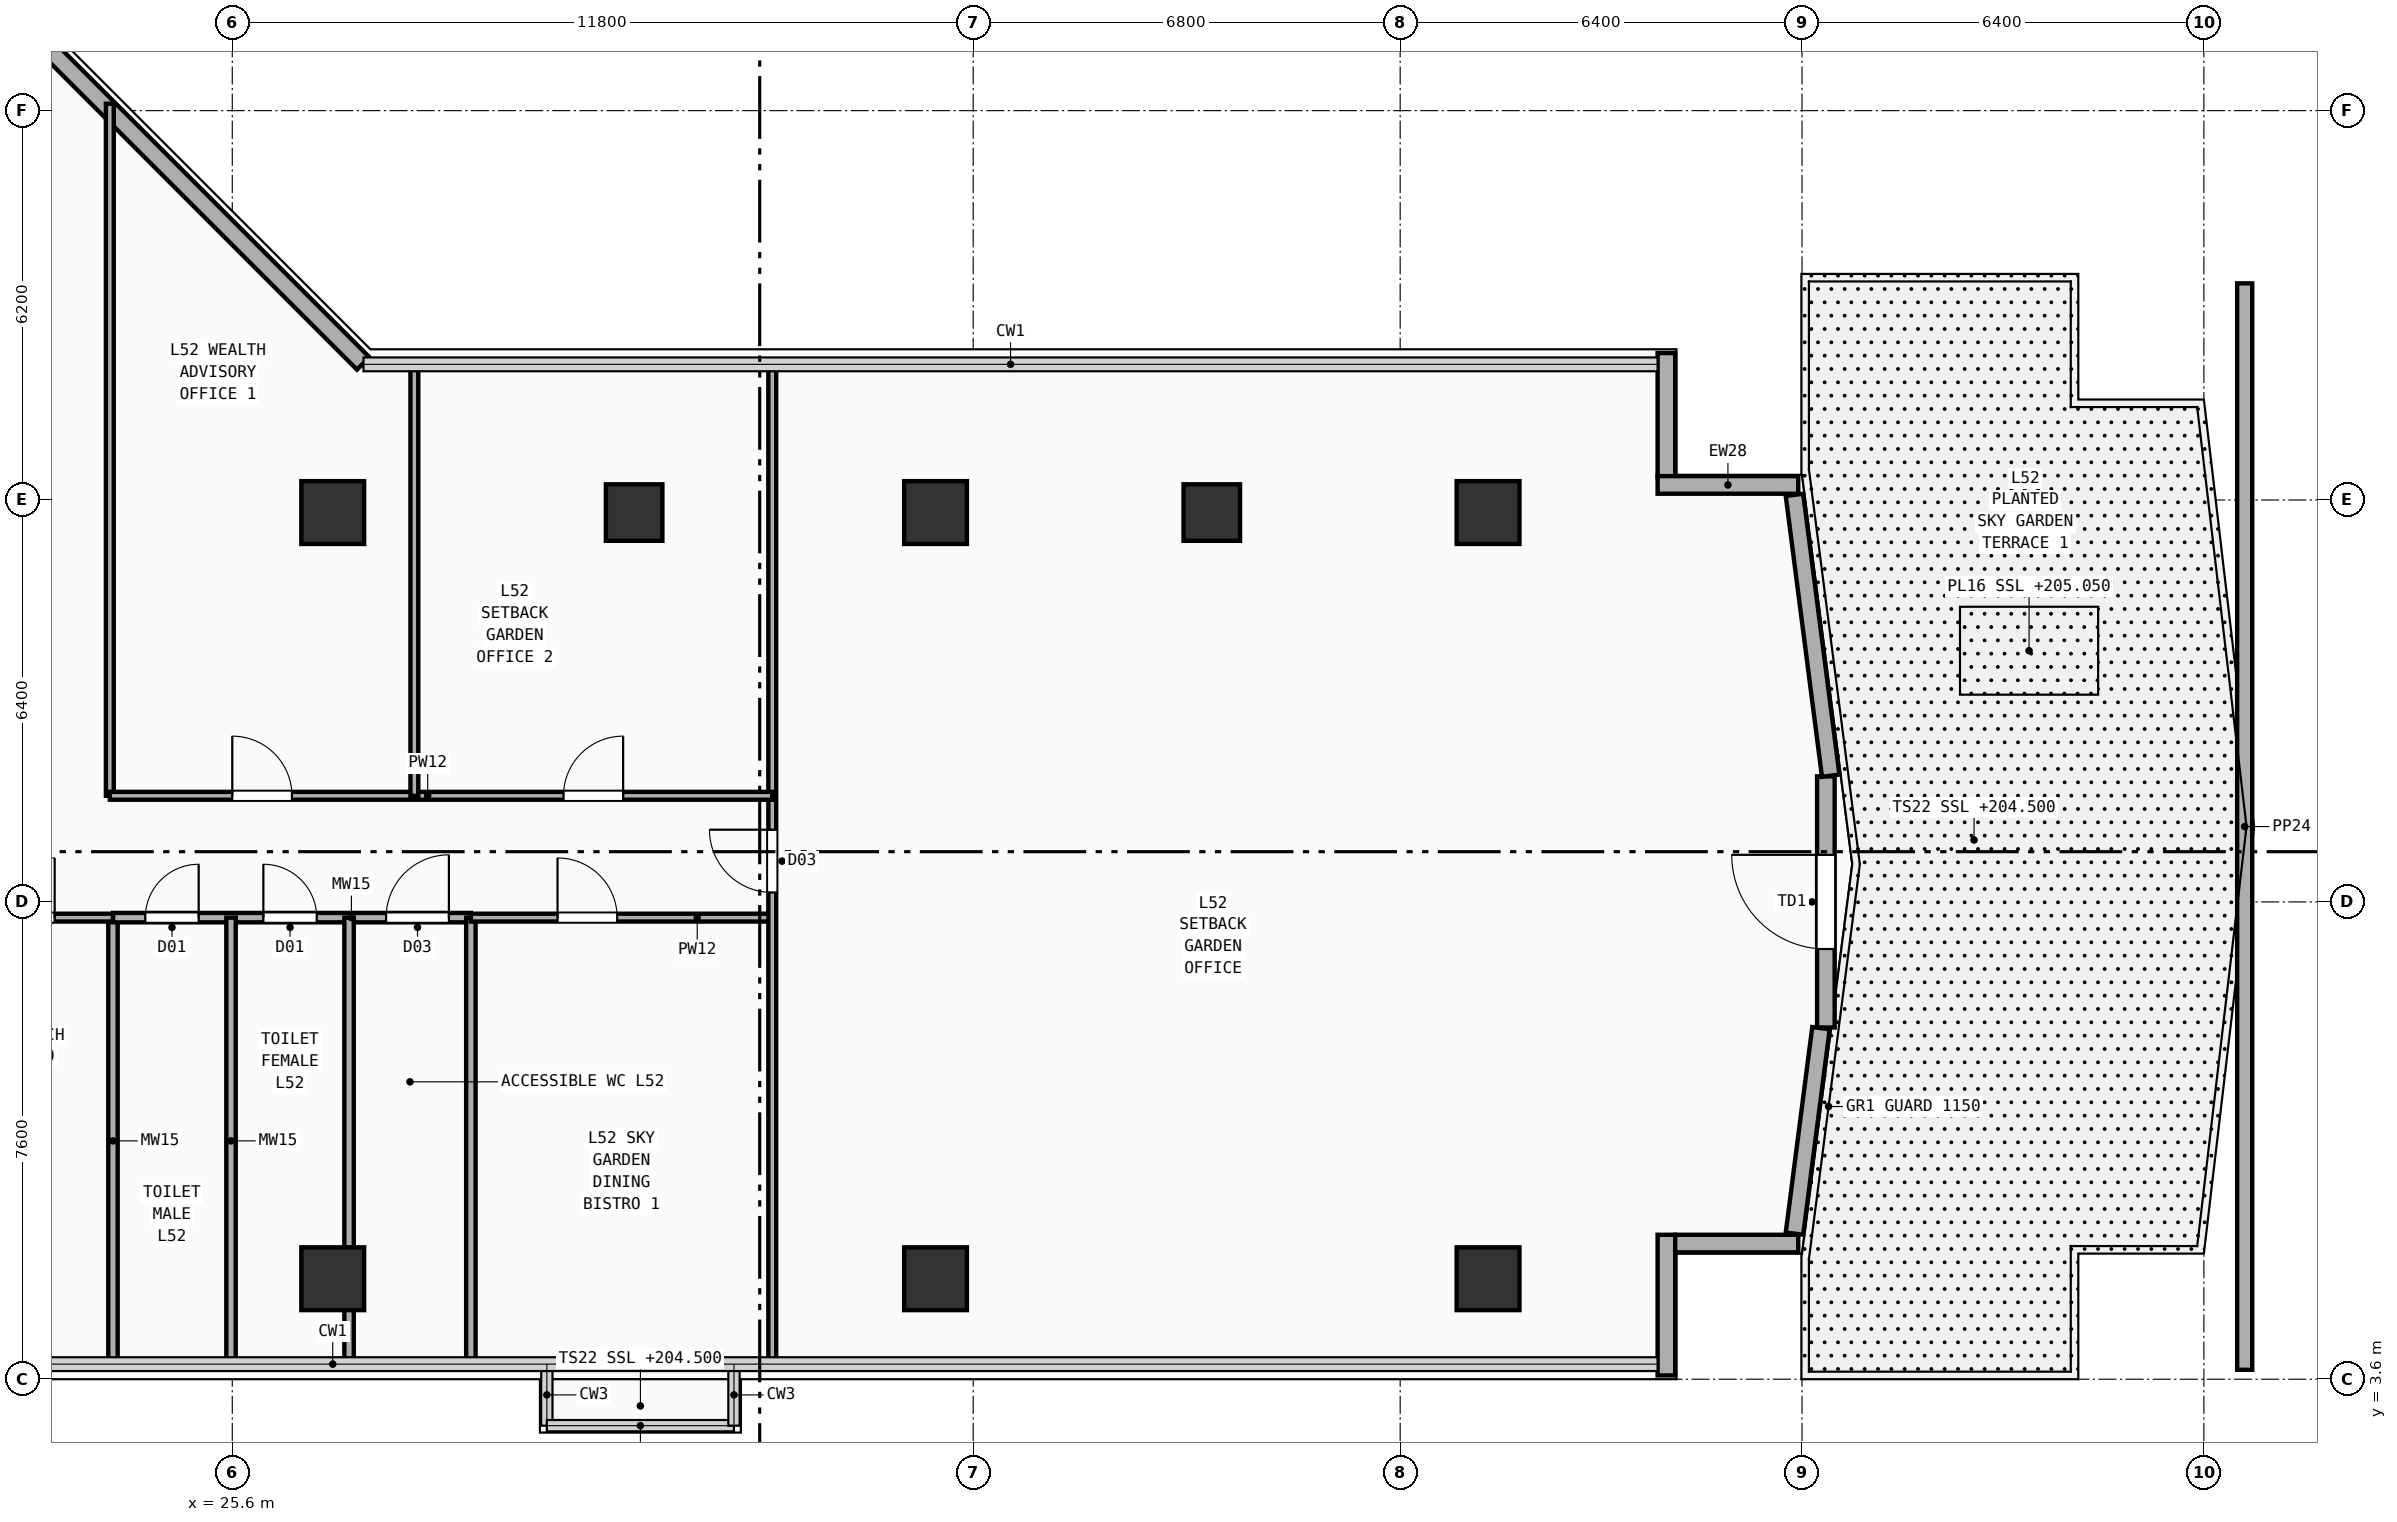
"""IFC4 building model, lengths in metres.
Left out: names, types, materials, properties, quantities, classifications, styles, units other than length and angle.
Written with IfcOpenShell. Run it as: python <this file> out.ifc"""

import sys

from ifc_helpers import new_model, si_unit, direction, frame, frame_2d, origin, origin_2d, place, context, subcontext, project, spatial, rectangle, extrude, element, fill, save


model = new_model("IFC4")
c1 = context("Model", 3, precision=1e-05, world=origin(), true_north=direction((0.0, 1.0)))
c2 = subcontext(c1, "Body", "Model", "MODEL_VIEW")
j1 = project(units=[si_unit("LENGTHUNIT", "METRE"), si_unit("PLANEANGLEUNIT", "RADIAN")], contexts=[c1])
p1 = place(None, origin())
s1 = spatial("IfcSite", under=j1, at=p1, CompositionType="ELEMENT")
p2 = place(p1, origin())
s2 = spatial("IfcBuilding", under=s1, at=p2, CompositionType="ELEMENT")
p3 = place(p2, frame((0.0, 0.0, 204.5)))
s3 = spatial("IfcBuildingStorey", under=s2, at=p3, CompositionType="ELEMENT", Elevation=204.5)
for number, where, z_axis, x_axis in (
    (1, (27.2, 5.2, 0.0), (0.0, 0.0, 1.0), (1.0, 0.0, 0.0)),
    (2, (36.8, 5.2, 0.0), (0.0, 0.0, 1.0), (1.0, 0.0, 0.0)),
    (3, (45.6, 5.2, 0.0), (0.0, 0.0, 1.0), (1.0, 0.0, 0.0)),
    (4, (27.2, 17.4, 0.0), (0.0, 0.0, 1.0), (1.0, 0.0, 0.0)),
    (5, (36.8, 17.4, 0.0), (0.0, 0.0, 1.0), (1.0, 0.0, 0.0)),
    (6, (45.6, 17.4, 0.0), (0.0, 0.0, 1.0), (1.0, 0.0, 0.0)),
):
    element("IfcColumn", number, at=place(p3, frame(where, z_axis=z_axis, x_axis=x_axis)), inside=s3, PredefinedType="COLUMN", context=c2, shape_type="SweptSolid", body=[
        extrude(rectangle(XDim=1.0, YDim=1.0, at=origin_2d()), origin(), (0.0, 0.0, 1.0), 3.56),
    ])
for number, where, z_axis, x_axis in (
    (7, (32.0, 17.4, 0.0), (0.0, 0.0, 1.0), (1.0, 0.0, 0.0)),
    (8, (41.2, 17.4, 0.0), (0.0, 0.0, 1.0), (1.0, 0.0, 0.0)),
):
    element("IfcColumn", number, at=place(p3, frame(where, z_axis=z_axis, x_axis=x_axis)), inside=s3, PredefinedType="COLUMN", context=c2, shape_type="SweptSolid", body=[
        extrude(rectangle(XDim=0.9, YDim=0.9, at=origin_2d()), origin(), (0.0, 0.0, 1.0), 3.56),
    ])
p4 = place(p3, frame((50.98, 9.2, 0.0), z_axis=(0.0, 0.0, 1.0), x_axis=(0.0, 1.0, 0.0)))
e9 = element("IfcWall", 9, at=p4, inside=s3, PredefinedType="SOLIDWALL", context=c2, shape_type="SweptSolid", body=[
    extrude(rectangle(XDim=4.0, YDim=0.28, at=frame_2d((2.0, 0.0))), origin(), (0.0, 0.0, 1.0), 3.56),
])
p5 = place(p4, frame((1.25, 0.0, 0.0)))
e10 = element("IfcOpeningElement", 10, at=p5, cuts=e9, PredefinedType="OPENING", context=c2, shape_type="SweptSolid", body=[
    extrude(rectangle(XDim=1.5, YDim=2.25, at=frame_2d((0.75, 1.125))), frame((0.0, 0.15, 0.0), z_axis=(0.0, -1.0, 0.0), x_axis=(1.0, 0.0, 0.0)), (0.0, 0.0, 1.0), 0.3),
])
p6 = place(p3, frame((57.65, 3.75, 0.0), z_axis=(0.0, 0.0, 1.0), x_axis=(0.0, 1.0, 0.0)))
e11 = element("IfcWall", 11, at=p6, inside=s3, PredefinedType="PARAPET", context=c2, shape_type="SweptSolid", body=[
    extrude(rectangle(XDim=17.3, YDim=0.24, at=frame_2d((8.65, 0.0))), origin(), (0.0, 0.0, 1.0), 0.42),
])
p7 = place(p3, frame((48.44, 3.66, 0.0), z_axis=(0.0, 0.0, 1.0), x_axis=(0.0, 1.0, 0.0)))
e12 = element("IfcWall", 12, at=p7, inside=s3, PredefinedType="SOLIDWALL", context=c2, shape_type="SweptSolid", body=[
    extrude(rectangle(XDim=2.24, YDim=0.28, at=frame_2d((1.12, 0.0))), origin(), (0.0, 0.0, 1.0), 3.56),
])
p8 = place(p3, frame((48.58, 5.76, 0.0), z_axis=(0.0, 0.0, 1.0), x_axis=(1.0, 0.0, 0.0)))
e13 = element("IfcWall", 13, at=p8, inside=s3, PredefinedType="SOLIDWALL", context=c2, shape_type="SweptSolid", body=[
    extrude(rectangle(XDim=1.96, YDim=0.28, at=frame_2d((0.98, 0.0))), origin(), (0.0, 0.0, 1.0), 3.56),
])
p9 = place(p3, frame((48.44, 17.965, 0.0), z_axis=(0.0, 0.0, 1.0), x_axis=(0.0, 1.0, 0.0)))
e14 = element("IfcWall", 14, at=p9, inside=s3, PredefinedType="SOLIDWALL", context=c2, shape_type="SweptSolid", body=[
    extrude(rectangle(XDim=1.975, YDim=0.28, at=frame_2d((0.987, 0.0))), origin(), (0.0, 0.0, 1.0), 3.56),
])
p10 = place(p3, frame((48.3, 17.84, 0.0), z_axis=(0.0, 0.0, 1.0), x_axis=(1.0, 0.0, 0.0)))
e15 = element("IfcWall", 15, at=p10, inside=s3, PredefinedType="SOLIDWALL", context=c2, shape_type="SweptSolid", body=[
    extrude(rectangle(XDim=2.24, YDim=0.28, at=frame_2d((1.12, 0.0))), origin(), (0.0, 0.0, 1.0), 3.56),
])
p11 = place(p3, frame((27.685, 19.775, 0.0), z_axis=(0.0, 0.0, 1.0), x_axis=(-0.707106781187, 0.707106781187, 0.0)))
e16 = element("IfcWall", 16, at=p11, inside=s3, PredefinedType="SOLIDWALL", context=c2, shape_type="SweptSolid", body=[
    extrude(rectangle(XDim=9.207, YDim=0.28, at=frame_2d((4.603, 0.0))), origin(), (0.0, 0.0, 1.0), 3.56),
])
p12 = place(p3, frame((50.48, 5.918, 0.0), z_axis=(0.0, 0.0, 1.0), x_axis=(0.12795020487, 0.991780593213, 0.0)))
e17 = element("IfcWall", 17, at=p12, inside=s3, PredefinedType="SOLIDWALL", context=c2, shape_type="SweptSolid", body=[
    extrude(rectangle(XDim=3.299, YDim=0.28, at=frame_2d((1.649, 0.0))), origin(), (0.0, 0.0, 1.0), 3.56),
])
p13 = place(p3, frame((51.057, 13.21, 0.0), z_axis=(0.0, 0.0, 1.0), x_axis=(-0.127945567261, 0.991781191503, 0.0)))
e18 = element("IfcWall", 18, at=p13, inside=s3, PredefinedType="SOLIDWALL", context=c2, shape_type="SweptSolid", body=[
    extrude(rectangle(XDim=4.509, YDim=0.28, at=frame_2d((2.254, 0.0))), origin(), (0.0, 0.0, 1.0), 3.56),
])
p14 = place(p3, frame((23.7, 3.84, 0.0), z_axis=(0.0, 0.0, 1.0), x_axis=(0.0, 1.0, 0.0)))
e19 = element("IfcWall", 19, at=p14, inside=s3, PredefinedType="PLUMBINGWALL", context=c2, shape_type="SweptSolid", body=[
    extrude(rectangle(XDim=7.11, YDim=0.15, at=frame_2d((3.555, 0.0))), origin(), (0.0, 0.0, 1.0), 3.56),
])
p15 = place(p3, frame((23.7, 10.95, 0.0), z_axis=(0.0, 0.0, 1.0), x_axis=(1.0, 0.0, 0.0)))
e20 = element("IfcWall", 20, at=p15, inside=s3, PredefinedType="PLUMBINGWALL", context=c2, shape_type="SweptSolid", body=[
    extrude(rectangle(XDim=5.7, YDim=0.15, at=frame_2d((2.85, 0.0))), origin(), (0.0, 0.0, 1.0), 3.56),
])
p16 = place(p15, frame((0.515, 0.0, 0.0)))
e21 = element("IfcOpeningElement", 21, at=p16, cuts=e20, PredefinedType="OPENING", context=c2, shape_type="SweptSolid", body=[
    extrude(rectangle(XDim=0.85, YDim=2.15, at=frame_2d((0.425, 1.075))), frame((0.0, 0.085, 0.0), z_axis=(0.0, -1.0, 0.0), x_axis=(1.0, 0.0, 0.0)), (0.0, 0.0, 1.0), 0.17),
])
p17 = place(p15, frame((2.395, 0.0, 0.0)))
e22 = element("IfcOpeningElement", 22, at=p17, cuts=e20, PredefinedType="OPENING", context=c2, shape_type="SweptSolid", body=[
    extrude(rectangle(XDim=0.85, YDim=2.15, at=frame_2d((0.425, 1.075))), frame((0.0, 0.085, 0.0), z_axis=(0.0, -1.0, 0.0), x_axis=(1.0, 0.0, 0.0)), (0.0, 0.0, 1.0), 0.17),
])
p18 = place(p15, frame((4.35, 0.0, 0.0)))
e23 = element("IfcOpeningElement", 23, at=p18, cuts=e20, PredefinedType="OPENING", context=c2, shape_type="SweptSolid", body=[
    extrude(rectangle(XDim=1.0, YDim=2.2, at=frame_2d((0.5, 1.1))), frame((0.0, 0.085, 0.0), z_axis=(0.0, -1.0, 0.0), x_axis=(1.0, 0.0, 0.0)), (0.0, 0.0, 1.0), 0.17),
])
p19 = place(p3, frame((25.58, 3.84, 0.0), z_axis=(0.0, 0.0, 1.0), x_axis=(0.0, 1.0, 0.0)))
e24 = element("IfcWall", 24, at=p19, inside=s3, PredefinedType="PLUMBINGWALL", context=c2, shape_type="SweptSolid", body=[
    extrude(rectangle(XDim=7.11, YDim=0.15, at=frame_2d((3.555, 0.0))), origin(), (0.0, 0.0, 1.0), 3.56),
])
p20 = place(p3, frame((27.46, 3.84, 0.0), z_axis=(0.0, 0.0, 1.0), x_axis=(0.0, 1.0, 0.0)))
e25 = element("IfcWall", 25, at=p20, inside=s3, PredefinedType="PLUMBINGWALL", context=c2, shape_type="SweptSolid", body=[
    extrude(rectangle(XDim=7.11, YDim=0.15, at=frame_2d((3.555, 0.0))), origin(), (0.0, 0.0, 1.0), 3.16),
])
p21 = place(p3, frame((29.4, 3.84, 0.0), z_axis=(0.0, 0.0, 1.0), x_axis=(0.0, 1.0, 0.0)))
e26 = element("IfcWall", 26, at=p21, inside=s3, PredefinedType="PLUMBINGWALL", context=c2, shape_type="SweptSolid", body=[
    extrude(rectangle(XDim=7.11, YDim=0.15, at=frame_2d((3.555, 0.0))), origin(), (0.0, 0.0, 1.0), 3.56),
])
p22 = place(p3, frame((20.85, 10.95, 0.0), z_axis=(0.0, 0.0, 1.0), x_axis=(1.0, 0.0, 0.0)))
e27 = element("IfcWall", 27, at=p22, inside=s3, PredefinedType="PARTITIONING", context=c2, shape_type="SweptSolid", body=[
    extrude(rectangle(XDim=2.85, YDim=0.125, at=frame_2d((1.425, 0.0))), origin(), (0.0, 0.0, 1.0), 3.56),
])
p23 = place(p22, frame((0.971, 0.0, 0.0)))
e28 = element("IfcOpeningElement", 28, at=p23, cuts=e27, PredefinedType="OPENING", context=c2, shape_type="SweptSolid", body=[
    extrude(rectangle(XDim=0.95, YDim=2.15, at=frame_2d((0.475, 1.075))), frame((0.0, 0.073, 0.0), z_axis=(0.0, -1.0, 0.0), x_axis=(1.0, 0.0, 0.0)), (0.0, 0.0, 1.0), 0.145),
])
p24 = place(p3, frame((29.4, 10.95, 0.0), z_axis=(0.0, 0.0, 1.0), x_axis=(1.0, 0.0, 0.0)))
e29 = element("IfcWall", 29, at=p24, inside=s3, PredefinedType="PARTITIONING", context=c2, shape_type="SweptSolid", body=[
    extrude(rectangle(XDim=4.8, YDim=0.125, at=frame_2d((2.4, 0.0))), origin(), (0.0, 0.0, 1.0), 3.56),
])
p25 = place(p24, frame((1.38, 0.0, 0.0)))
e30 = element("IfcOpeningElement", 30, at=p25, cuts=e29, PredefinedType="OPENING", context=c2, shape_type="SweptSolid", body=[
    extrude(rectangle(XDim=0.95, YDim=2.15, at=frame_2d((0.475, 1.075))), frame((0.0, 0.073, 0.0), z_axis=(0.0, -1.0, 0.0), x_axis=(1.0, 0.0, 0.0)), (0.0, 0.0, 1.0), 0.145),
])
p26 = place(p3, frame((34.2, 3.84, 0.0), z_axis=(0.0, 0.0, 1.0), x_axis=(0.0, 1.0, 0.0)))
e31 = element("IfcWall", 31, at=p26, inside=s3, PredefinedType="PARTITIONING", context=c2, shape_type="SweptSolid", body=[
    extrude(rectangle(XDim=15.92, YDim=0.125, at=frame_2d((7.96, 0.0))), origin(), (0.0, 0.0, 1.0), 3.56),
])
p27 = place(p26, frame((7.51, 0.0, 0.0)))
e32 = element("IfcOpeningElement", 32, at=p27, cuts=e31, PredefinedType="OPENING", context=c2, shape_type="SweptSolid", body=[
    extrude(rectangle(XDim=1.0, YDim=2.2, at=frame_2d((0.5, 1.1))), frame((0.0, 0.073, 0.0), z_axis=(0.0, -1.0, 0.0), x_axis=(1.0, 0.0, 0.0)), (0.0, 0.0, 1.0), 0.145),
])
p28 = place(p3, frame((23.65, 12.89, 0.0), z_axis=(0.0, 0.0, 1.0), x_axis=(0.0, 1.0, 0.0)))
e33 = element("IfcWall", 33, at=p28, inside=s3, PredefinedType="PARTITIONING", context=c2, shape_type="SweptSolid", body=[
    extrude(rectangle(XDim=11.02, YDim=0.125, at=frame_2d((5.51, 0.0))), origin(), (0.0, 0.0, 1.0), 3.56),
])
p29 = place(p3, frame((23.65, 12.89, 0.0), z_axis=(0.0, 0.0, 1.0), x_axis=(1.0, 0.0, 0.0)))
e34 = element("IfcWall", 34, at=p29, inside=s3, PredefinedType="PARTITIONING", context=c2, shape_type="SweptSolid", body=[
    extrude(rectangle(XDim=10.55, YDim=0.125, at=frame_2d((5.275, 0.0))), origin(), (0.0, 0.0, 1.0), 3.56),
])
p30 = place(p29, frame((1.95, 0.0, 0.0)))
e35 = element("IfcOpeningElement", 35, at=p30, cuts=e34, PredefinedType="OPENING", context=c2, shape_type="SweptSolid", body=[
    extrude(rectangle(XDim=0.95, YDim=2.15, at=frame_2d((0.475, 1.075))), frame((0.0, 0.073, 0.0), z_axis=(0.0, -1.0, 0.0), x_axis=(1.0, 0.0, 0.0)), (0.0, 0.0, 1.0), 0.145),
])
p31 = place(p29, frame((7.225, 0.0, 0.0)))
e36 = element("IfcOpeningElement", 36, at=p31, cuts=e34, PredefinedType="OPENING", context=c2, shape_type="SweptSolid", body=[
    extrude(rectangle(XDim=0.95, YDim=2.15, at=frame_2d((0.475, 1.075))), frame((0.0, 0.073, 0.0), z_axis=(0.0, -1.0, 0.0), x_axis=(1.0, 0.0, 0.0)), (0.0, 0.0, 1.0), 0.145),
])
p32 = place(p3, frame((28.5, 12.89, 0.0), z_axis=(0.0, 0.0, 1.0), x_axis=(0.0, 1.0, 0.0)))
e37 = element("IfcWall", 37, at=p32, inside=s3, PredefinedType="PARTITIONING", context=c2, shape_type="SweptSolid", body=[
    extrude(rectangle(XDim=6.87, YDim=0.125, at=frame_2d((3.435, 0.0))), origin(), (0.0, 0.0, 1.0), 3.56),
])
p33 = place(p5, frame((1.5, 0.0, 0.0), z_axis=(0.0, 0.0, 1.0), x_axis=(-1.0, 0.0, 0.0)))
e38 = element("IfcDoor", 38, at=p33, inside=s3, OperationType="SINGLE_SWING_LEFT", PredefinedType="DOOR", context=c2, shape_type="SweptSolid", body=[
    extrude(rectangle(XDim=1.5, YDim=2.25, at=frame_2d((0.75, 1.125))), frame((0.0, 0.025, 0.0), z_axis=(0.0, -1.0, 0.0), x_axis=(1.0, 0.0, 0.0)), (0.0, 0.0, 1.0), 0.05),
])
fill(e10, e38)
p34 = place(p16, origin())
e39 = element("IfcDoor", 39, at=p34, inside=s3, OperationType="SINGLE_SWING_RIGHT", PredefinedType="DOOR", context=c2, shape_type="SweptSolid", body=[
    extrude(rectangle(XDim=0.85, YDim=2.15, at=frame_2d((0.425, 1.075))), frame((0.0, 0.025, 0.0), z_axis=(0.0, -1.0, 0.0), x_axis=(1.0, 0.0, 0.0)), (0.0, 0.0, 1.0), 0.05),
])
fill(e21, e39)
p35 = place(p17, origin())
e40 = element("IfcDoor", 40, at=p35, inside=s3, OperationType="SINGLE_SWING_LEFT", PredefinedType="DOOR", context=c2, shape_type="SweptSolid", body=[
    extrude(rectangle(XDim=0.85, YDim=2.15, at=frame_2d((0.425, 1.075))), frame((0.0, 0.025, 0.0), z_axis=(0.0, -1.0, 0.0), x_axis=(1.0, 0.0, 0.0)), (0.0, 0.0, 1.0), 0.05),
])
fill(e22, e40)
p36 = place(p18, origin())
e41 = element("IfcDoor", 41, at=p36, inside=s3, OperationType="SINGLE_SWING_RIGHT", PredefinedType="DOOR", context=c2, shape_type="SweptSolid", body=[
    extrude(rectangle(XDim=1.0, YDim=2.2, at=frame_2d((0.5, 1.1))), frame((0.0, 0.025, 0.0), z_axis=(0.0, -1.0, 0.0), x_axis=(1.0, 0.0, 0.0)), (0.0, 0.0, 1.0), 0.05),
])
fill(e23, e41)
p37 = place(p23, origin())
e42 = element("IfcDoor", 42, at=p37, inside=s3, OperationType="SINGLE_SWING_RIGHT", PredefinedType="DOOR", context=c2, shape_type="SweptSolid", body=[
    extrude(rectangle(XDim=0.95, YDim=2.15, at=frame_2d((0.475, 1.075))), frame((0.0, 0.025, 0.0), z_axis=(0.0, -1.0, 0.0), x_axis=(1.0, 0.0, 0.0)), (0.0, 0.0, 1.0), 0.05),
])
fill(e28, e42)
p38 = place(p25, origin())
e43 = element("IfcDoor", 43, at=p38, inside=s3, OperationType="SINGLE_SWING_LEFT", PredefinedType="DOOR", context=c2, shape_type="SweptSolid", body=[
    extrude(rectangle(XDim=0.95, YDim=2.15, at=frame_2d((0.475, 1.075))), frame((0.0, 0.025, 0.0), z_axis=(0.0, -1.0, 0.0), x_axis=(1.0, 0.0, 0.0)), (0.0, 0.0, 1.0), 0.05),
])
fill(e30, e43)
p39 = place(p27, origin())
e44 = element("IfcDoor", 44, at=p39, inside=s3, OperationType="SINGLE_SWING_RIGHT", PredefinedType="DOOR", context=c2, shape_type="SweptSolid", body=[
    extrude(rectangle(XDim=1.0, YDim=2.2, at=frame_2d((0.5, 1.1))), frame((0.0, 0.025, 0.0), z_axis=(0.0, -1.0, 0.0), x_axis=(1.0, 0.0, 0.0)), (0.0, 0.0, 1.0), 0.05),
])
fill(e32, e44)
p40 = place(p30, origin())
e45 = element("IfcDoor", 45, at=p40, inside=s3, OperationType="SINGLE_SWING_LEFT", PredefinedType="DOOR", context=c2, shape_type="SweptSolid", body=[
    extrude(rectangle(XDim=0.95, YDim=2.15, at=frame_2d((0.475, 1.075))), frame((0.0, 0.025, 0.0), z_axis=(0.0, -1.0, 0.0), x_axis=(1.0, 0.0, 0.0)), (0.0, 0.0, 1.0), 0.05),
])
fill(e35, e45)
p41 = place(p31, origin())
e46 = element("IfcDoor", 46, at=p41, inside=s3, OperationType="SINGLE_SWING_RIGHT", PredefinedType="DOOR", context=c2, shape_type="SweptSolid", body=[
    extrude(rectangle(XDim=0.95, YDim=2.15, at=frame_2d((0.475, 1.075))), frame((0.0, 0.025, 0.0), z_axis=(0.0, -1.0, 0.0), x_axis=(1.0, 0.0, 0.0)), (0.0, 0.0, 1.0), 0.05),
])
fill(e36, e46)
save(model, sys.argv[1])
